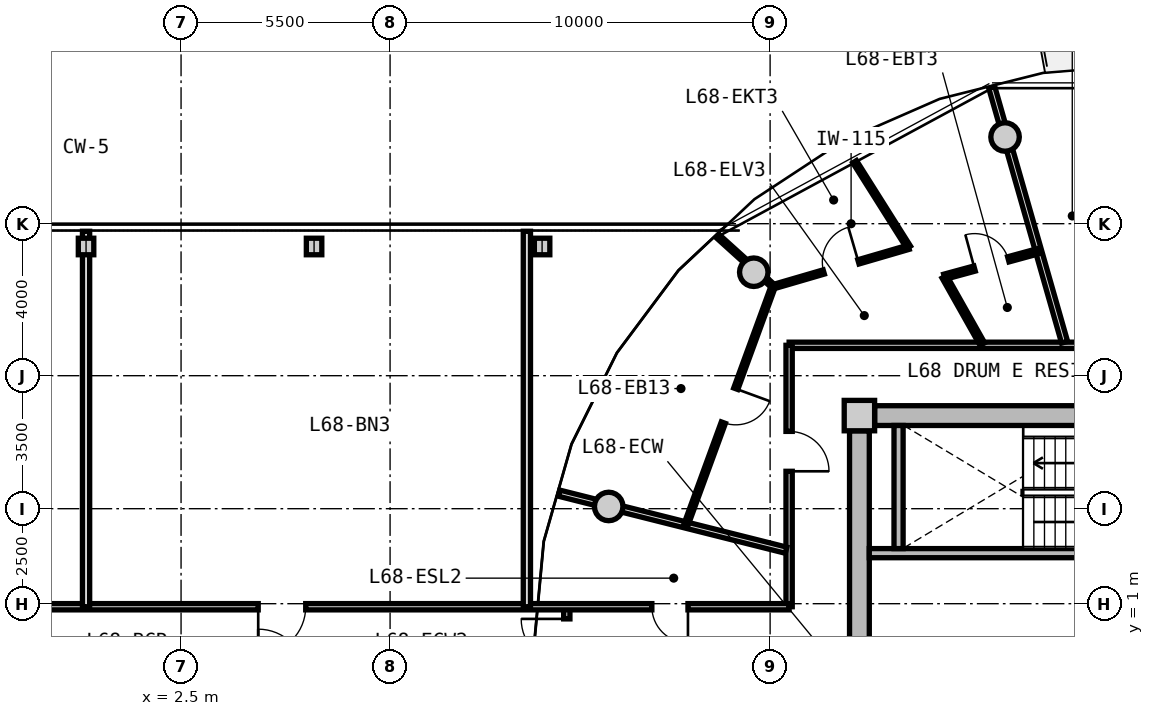
"""IFC4 building model, lengths in metres.
Left out: names, types, materials, properties, quantities, classifications, styles, units other than length and angle.
Written with IfcOpenShell. Run it as: python <this file> out.ifc"""

import sys

from ifc_helpers import new_model, si_unit, direction, frame, frame_2d, origin, origin_2d, place, context, subcontext, project, spatial, rectangle, circle, i_section, extrude, source, transform, mapped, element, fill, save


model = new_model("IFC4")
c1 = context("Model", 3, precision=1e-05, world=origin(), true_north=direction((0.0, 1.0)))
c2 = subcontext(c1, "Body", "Model", "MODEL_VIEW")
j1 = project(units=[si_unit("LENGTHUNIT", "METRE"), si_unit("PLANEANGLEUNIT", "RADIAN")], contexts=[c1])
p1 = place(None, origin())
s1 = spatial("IfcSite", under=j1, at=p1, CompositionType="ELEMENT")
p2 = place(p1, origin())
s2 = spatial("IfcBuilding", under=s1, at=p2, CompositionType="ELEMENT")
p3 = place(p2, frame((0.0, 0.0, 220.0)))
s3 = spatial("IfcBuildingStorey", under=s2, at=p3, CompositionType="ELEMENT", Elevation=220.0)
m1 = source(origin(), c2, "Body", "SweptSolid", [
    extrude(rectangle(XDim=0.8, YDim=0.8, at=origin_2d()), origin(), (0.0, 0.0, 1.0), 3.05),
])
p4 = place(p3, frame((20.35, 5.95, 0.0), z_axis=(0.0, 0.0, 1.0), x_axis=(1.0, 0.0, 0.0)))
e1 = element("IfcColumn", 1, at=p4, inside=s3, PredefinedType="COLUMN", context=c2, shape_type="MappedRepresentation", body=[
    mapped(m1, transform((0.0, 0.0, 0.0), x_axis=(1.0, 0.0, 0.0), y_axis=(0.0, 1.0, 0.0), z_axis=(0.0, 0.0, 1.0), scale=1.0)),
])
m2 = source(origin(), c2, "Body", "SweptSolid", [
    extrude(rectangle(XDim=14.5, YDim=0.52, at=frame_2d((7.25, 0.0))), origin(), (0.0, 0.0, 1.0), 2.76),
])
p5 = place(p3, frame((20.75, 5.95, 0.0), z_axis=(0.0, 0.0, 1.0), x_axis=(1.0, 0.0, 0.0)))
e2 = element("IfcWall", 2, at=p5, inside=s3, PredefinedType="SHEAR", context=c2, shape_type="MappedRepresentation", body=[
    mapped(m2, transform((0.0, 0.0, 0.0), x_axis=(1.0, 0.0, 0.0), y_axis=(0.0, 1.0, 0.0), z_axis=(0.0, 0.0, 1.0), scale=1.0)),
])
m3 = source(origin(), c2, "Body", "SweptSolid", [
    extrude(rectangle(XDim=11.1, YDim=0.52, at=frame_2d((5.55, 0.0))), origin(), (0.0, 0.0, 1.0), 2.76),
])
p6 = place(p3, frame((20.35, -5.55, 0.0), z_axis=(0.0, 0.0, 1.0), x_axis=(0.0, 1.0, 0.0)))
e3 = element("IfcWall", 3, at=p6, inside=s3, PredefinedType="SHEAR", context=c2, shape_type="MappedRepresentation", body=[
    mapped(m3, transform((0.0, 0.0, 0.0), x_axis=(1.0, 0.0, 0.0), y_axis=(0.0, 1.0, 0.0), z_axis=(0.0, 0.0, 1.0), scale=1.0)),
])
p7 = place(p6, frame((3.8, 0.0, 0.0)))
e4 = element("IfcOpeningElement", 4, at=p7, cuts=e3, PredefinedType="OPENING", context=c2, shape_type="SweptSolid", body=[
    extrude(rectangle(XDim=1.2, YDim=2.15, at=frame_2d((0.6, 1.075))), frame((0.0, 0.27, 0.0), z_axis=(0.0, -1.0, 0.0), x_axis=(1.0, 0.0, 0.0)), (0.0, 0.0, 1.0), 0.54),
])
m4 = source(origin(), c2, "Body", "SweptSolid", [
    extrude(circle(Radius=0.375, at=origin_2d()), origin(), (0.0, 0.0, 1.0), 3.05),
])
for number, where, z_axis, x_axis in (
    (5, (24.182, 13.281, 0.0), (0.0, 0.0, 1.0), (1.0, 0.0, 0.0)),
    (6, (17.57, 9.723, 0.0), (0.0, 0.0, 1.0), (1.0, 0.0, 0.0)),
    (7, (13.753, 3.559, 0.0), (0.0, 0.0, 1.0), (1.0, 0.0, 0.0)),
):
    element("IfcColumn", number, at=place(p3, frame(where, z_axis=z_axis, x_axis=x_axis)), inside=s3, PredefinedType="COLUMN", context=c2, shape_type="MappedRepresentation", body=[
        mapped(m4, transform((0.0, 0.0, 0.0), x_axis=(1.0, 0.0, 0.0), y_axis=(0.0, 1.0, 0.0), z_axis=(0.0, 0.0, 1.0), scale=1.0)),
    ])
m5 = source(origin(), c2, "Body", "SweptSolid", [
    extrude(i_section(OverallWidth=0.407, OverallDepth=0.435, WebThickness=0.024, FlangeThickness=0.039, FilletRadius=0.015, at=origin_2d()), origin(), (0.0, 0.0, 1.0), 3.05),
])
for number, where, z_axis, x_axis in (
    (8, (0.0, 10.4, 0.0), (0.0, 0.0, 1.0), (1.0, 0.0, 0.0)),
    (9, (6.0, 10.4, 0.0), (0.0, 0.0, 1.0), (1.0, 0.0, 0.0)),
    (10, (12.0, 10.4, 0.0), (0.0, 0.0, 1.0), (1.0, 0.0, 0.0)),
):
    element("IfcColumn", number, at=place(p3, frame(where, z_axis=z_axis, x_axis=x_axis)), inside=s3, PredefinedType="COLUMN", context=c2, shape_type="MappedRepresentation", body=[
        mapped(m5, transform((0.0, 0.0, 0.0), x_axis=(1.0, 0.0, 0.0), y_axis=(0.0, 1.0, 0.0), z_axis=(0.0, 0.0, 1.0), scale=1.0)),
    ])
m6 = source(origin(), c2, "Body", "SweptSolid", [
    extrude(rectangle(XDim=7.93, YDim=0.24, at=frame_2d((3.965, 0.0))), origin(), (0.0, 0.0, 1.0), 2.76),
])
p8 = place(p3, frame((20.61, 2.33, 0.0), z_axis=(0.0, 0.0, 1.0), x_axis=(1.0, 0.0, 0.0)))
e11 = element("IfcWall", 11, at=p8, inside=s3, PredefinedType="PARTITIONING", context=c2, shape_type="MappedRepresentation", body=[
    mapped(m6, transform((0.0, 0.0, 0.0), x_axis=(1.0, 0.0, 0.0), y_axis=(0.0, 1.0, 0.0), z_axis=(0.0, 0.0, 1.0), scale=1.0)),
])
m7 = source(origin(), c2, "Body", "SweptSolid", [
    extrude(rectangle(XDim=3.24, YDim=0.24, at=frame_2d((1.62, 0.0))), origin(), (0.0, 0.0, 1.0), 2.76),
])
p9 = place(p3, frame((21.38, 2.45, 0.0), z_axis=(0.0, 0.0, 1.0), x_axis=(0.0, 1.0, 0.0)))
e12 = element("IfcWall", 12, at=p9, inside=s3, PredefinedType="PARTITIONING", context=c2, shape_type="MappedRepresentation", body=[
    mapped(m7, transform((0.0, 0.0, 0.0), x_axis=(1.0, 0.0, 0.0), y_axis=(0.0, 1.0, 0.0), z_axis=(0.0, 0.0, 1.0), scale=1.0)),
])
m8 = source(origin(), c2, "Body", "SweptSolid", [
    extrude(rectangle(XDim=8.58, YDim=0.165, at=frame_2d((4.29, 0.0))), origin(), (0.0, 0.0, 1.0), 2.745),
])
p10 = place(p3, frame((18.5, 7.8, 0.0), z_axis=(0.0, 0.0, 1.0), x_axis=(1.0, 0.0, 0.0)))
e13 = element("IfcWall", 13, at=p10, inside=s3, PredefinedType="PARTITIONING", context=c2, shape_type="MappedRepresentation", body=[
    mapped(m8, transform((0.0, 0.0, 0.0), x_axis=(1.0, 0.0, 0.0), y_axis=(0.0, 1.0, 0.0), z_axis=(0.0, 0.0, 1.0), scale=1.0)),
])
m9 = source(origin(), c2, "Body", "SweptSolid", [
    extrude(rectangle(XDim=6.88, YDim=0.165, at=frame_2d((3.44, 0.0))), origin(), (0.0, 0.0, 1.0), 2.745),
])
p11 = place(p3, frame((18.5, 0.92, 0.0), z_axis=(0.0, 0.0, 1.0), x_axis=(0.0, 1.0, 0.0)))
e14 = element("IfcWall", 14, at=p11, inside=s3, PredefinedType="PARTITIONING", context=c2, shape_type="MappedRepresentation", body=[
    mapped(m9, transform((0.0, 0.0, 0.0), x_axis=(1.0, 0.0, 0.0), y_axis=(0.0, 1.0, 0.0), z_axis=(0.0, 0.0, 1.0), scale=1.0)),
])
p12 = place(p11, frame((3.564, 0.0, 0.0)))
e15 = element("IfcOpeningElement", 15, at=p12, cuts=e14, PredefinedType="OPENING", context=c2, shape_type="SweptSolid", body=[
    extrude(rectangle(XDim=1.05, YDim=2.15, at=frame_2d((0.525, 1.075))), frame((0.0, 0.093, 0.0), z_axis=(0.0, -1.0, 0.0), x_axis=(1.0, 0.0, 0.0)), (0.0, 0.0, 1.0), 0.185),
])
m10 = source(origin(), c2, "Body", "SweptSolid", [
    extrude(rectangle(XDim=6.974, YDim=0.165, at=frame_2d((3.487, 0.0))), origin(), (0.0, 0.0, 1.0), 2.345),
])
p13 = place(p3, frame((25.749, 7.88, 0.0), z_axis=(0.0, 0.0, 1.0), x_axis=(-0.274707256801, 0.961527910703, 0.0)))
e16 = element("IfcWall", 16, at=p13, inside=s3, PredefinedType="PARTITIONING", context=c2, shape_type="MappedRepresentation", body=[
    mapped(m10, transform((0.0, 0.0, 0.0), x_axis=(1.0, 0.0, 0.0), y_axis=(0.0, 1.0, 0.0), z_axis=(0.0, 0.0, 1.0), scale=1.0)),
])
m11 = source(origin(), c2, "Body", "SweptSolid", [
    extrude(rectangle(XDim=6.157, YDim=0.165, at=frame_2d((3.079, 0.0))), origin(), (0.0, 0.0, 1.0), 2.345),
])
p14 = place(p3, frame((18.42, 2.407, 0.0), z_axis=(0.0, 0.0, 1.0), x_axis=(-0.969840867184, 0.243738984038, 0.0)))
e17 = element("IfcWall", 17, at=p14, inside=s3, PredefinedType="PARTITIONING", context=c2, shape_type="MappedRepresentation", body=[
    mapped(m11, transform((0.0, 0.0, 0.0), x_axis=(1.0, 0.0, 0.0), y_axis=(0.0, 1.0, 0.0), z_axis=(0.0, 0.0, 1.0), scale=1.0)),
])
m12 = source(origin(), c2, "Body", "SweptSolid", [
    extrude(rectangle(XDim=6.69, YDim=0.115, at=frame_2d((3.345, 0.0))), origin(), (0.0, 0.0, 1.0), 2.745),
])
p15 = place(p3, frame((18.083, 9.352, 0.0), z_axis=(0.0, 0.0, 1.0), x_axis=(-0.343693784919, -0.939081776102, 0.0)))
e18 = element("IfcWall", 18, at=p15, inside=s3, PredefinedType="PARTITIONING", context=c2, shape_type="MappedRepresentation", body=[
    mapped(m12, transform((0.0, 0.0, 0.0), x_axis=(1.0, 0.0, 0.0), y_axis=(0.0, 1.0, 0.0), z_axis=(0.0, 0.0, 1.0), scale=1.0)),
])
p16 = place(p15, frame((2.87, 0.0, 0.0)))
e19 = element("IfcOpeningElement", 19, at=p16, cuts=e18, PredefinedType="OPENING", context=c2, shape_type="SweptSolid", body=[
    extrude(rectangle(XDim=0.95, YDim=2.1, at=frame_2d((0.475, 1.05))), frame((0.0, 0.067, 0.0), z_axis=(0.0, -1.0, 0.0), x_axis=(1.0, 0.0, 0.0)), (0.0, 0.0, 1.0), 0.135),
])
m13 = source(origin(), c2, "Body", "SweptSolid", [
    extrude(rectangle(XDim=1.977, YDim=0.115, at=frame_2d((0.989, 0.0))), origin(), (0.0, 0.0, 1.0), 2.345),
])
p17 = place(p3, frame((18.083, 9.352, 0.0), z_axis=(0.0, 0.0, 1.0), x_axis=(-0.742064998629, 0.670327933037, 0.0)))
e20 = element("IfcWall", 20, at=p17, inside=s3, PredefinedType="PARTITIONING", context=c2, shape_type="MappedRepresentation", body=[
    mapped(m13, transform((0.0, 0.0, 0.0), x_axis=(1.0, 0.0, 0.0), y_axis=(0.0, 1.0, 0.0), z_axis=(0.0, 0.0, 1.0), scale=1.0)),
])
m14 = source(origin(), c2, "Body", "SweptSolid", [
    extrude(rectangle(XDim=2.035, YDim=0.14, at=frame_2d((1.018, 0.0))), origin(), (0.0, 0.0, 1.0), 2.745),
])
p18 = place(p3, frame((23.585, 7.83, 0.0), z_axis=(0.0, 0.0, 1.0), x_axis=(-0.491092509169, 0.871107425888, 0.0)))
e21 = element("IfcWall", 21, at=p18, inside=s3, PredefinedType="PARTITIONING", context=c2, shape_type="MappedRepresentation", body=[
    mapped(m14, transform((0.0, 0.0, 0.0), x_axis=(1.0, 0.0, 0.0), y_axis=(0.0, 1.0, 0.0), z_axis=(0.0, 0.0, 1.0), scale=1.0)),
])
m15 = source(origin(), c2, "Body", "SweptSolid", [
    extrude(rectangle(XDim=2.568, YDim=0.14, at=frame_2d((1.284, 0.0))), origin(), (0.0, 0.0, 1.0), 2.745),
])
p19 = place(p3, frame((22.585, 9.603, 0.0), z_axis=(0.0, 0.0, 1.0), x_axis=(0.964796726679, 0.262996722775, 0.0)))
e22 = element("IfcWall", 22, at=p19, inside=s3, PredefinedType="PARTITIONING", context=c2, shape_type="MappedRepresentation", body=[
    mapped(m15, transform((0.0, 0.0, 0.0), x_axis=(1.0, 0.0, 0.0), y_axis=(0.0, 1.0, 0.0), z_axis=(0.0, 0.0, 1.0), scale=1.0)),
])
p20 = place(p19, frame((0.824, 0.0, 0.0)))
e23 = element("IfcOpeningElement", 23, at=p20, cuts=e22, PredefinedType="OPENING", context=c2, shape_type="SweptSolid", body=[
    extrude(rectangle(XDim=0.92, YDim=2.1, at=frame_2d((0.46, 1.05))), frame((0.0, 0.08, 0.0), z_axis=(0.0, -1.0, 0.0), x_axis=(1.0, 0.0, 0.0)), (0.0, 0.0, 1.0), 0.16),
])
m16 = source(origin(), c2, "Body", "SweptSolid", [
    extrude(rectangle(XDim=2.662, YDim=0.115, at=frame_2d((1.331, 0.0))), origin(), (0.0, 0.0, 1.0), 2.745),
])
p21 = place(p3, frame((21.645, 10.38, 0.0), z_axis=(0.0, 0.0, 1.0), x_axis=(-0.533547747092, 0.845769946009, 0.0)))
e24 = element("IfcWall", 24, at=p21, inside=s3, PredefinedType="PARTITIONING", context=c2, shape_type="MappedRepresentation", body=[
    mapped(m16, transform((0.0, 0.0, 0.0), x_axis=(1.0, 0.0, 0.0), y_axis=(0.0, 1.0, 0.0), z_axis=(0.0, 0.0, 1.0), scale=1.0)),
])
m17 = source(origin(), c2, "Body", "SweptSolid", [
    extrude(rectangle(XDim=3.702, YDim=0.115, at=frame_2d((1.851, 0.0))), origin(), (0.0, 0.0, 1.0), 2.745),
])
p22 = place(p3, frame((21.645, 10.38, 0.0), z_axis=(0.0, 0.0, 1.0), x_axis=(-0.960044309887, -0.279848035645, 0.0)))
e25 = element("IfcWall", 25, at=p22, inside=s3, PredefinedType="PARTITIONING", context=c2, shape_type="MappedRepresentation", body=[
    mapped(m17, transform((0.0, 0.0, 0.0), x_axis=(1.0, 0.0, 0.0), y_axis=(0.0, 1.0, 0.0), z_axis=(0.0, 0.0, 1.0), scale=1.0)),
])
p23 = place(p22, frame((1.376, 0.0, 0.0)))
e26 = element("IfcOpeningElement", 26, at=p23, cuts=e25, PredefinedType="OPENING", context=c2, shape_type="SweptSolid", body=[
    extrude(rectangle(XDim=0.95, YDim=2.1, at=frame_2d((0.475, 1.05))), frame((0.0, 0.067, 0.0), z_axis=(0.0, -1.0, 0.0), x_axis=(1.0, 0.0, 0.0)), (0.0, 0.0, 1.0), 0.135),
])
m18 = source(origin(), c2, "Body", "SweptSolid", [
    extrude(rectangle(XDim=1.84, YDim=0.165, at=frame_2d((0.92, 0.0))), origin(), (0.0, 0.0, 1.0), 2.745),
])
p24 = place(p3, frame((12.65, -0.92, 0.0), z_axis=(0.0, 0.0, 1.0), x_axis=(0.0, 1.0, 0.0)))
e27 = element("IfcWall", 27, at=p24, inside=s3, PredefinedType="PARTITIONING", context=c2, shape_type="MappedRepresentation", body=[
    mapped(m18, transform((0.0, 0.0, 0.0), x_axis=(1.0, 0.0, 0.0), y_axis=(0.0, 1.0, 0.0), z_axis=(0.0, 0.0, 1.0), scale=1.0)),
])
p25 = place(p24, frame((0.32, 0.0, 0.0)))
e28 = element("IfcOpeningElement", 28, at=p25, cuts=e27, PredefinedType="OPENING", context=c2, shape_type="SweptSolid", body=[
    extrude(rectangle(XDim=1.2, YDim=2.15, at=frame_2d((0.6, 1.075))), frame((0.0, 0.093, 0.0), z_axis=(0.0, -1.0, 0.0), x_axis=(1.0, 0.0, 0.0)), (0.0, 0.0, 1.0), 0.185),
])
m19 = source(origin(), c2, "Body", "SweptSolid", [
    extrude(rectangle(XDim=37.0, YDim=0.165, at=frame_2d((18.5, 0.0))), origin(), (0.0, 0.0, 1.0), 2.745),
])
p26 = place(p3, frame((-18.5, 0.92, 0.0), z_axis=(0.0, 0.0, 1.0), x_axis=(1.0, 0.0, 0.0)))
e29 = element("IfcWall", 29, at=p26, inside=s3, PredefinedType="PARTITIONING", context=c2, shape_type="MappedRepresentation", body=[
    mapped(m19, transform((0.0, 0.0, 0.0), x_axis=(1.0, 0.0, 0.0), y_axis=(0.0, 1.0, 0.0), z_axis=(0.0, 0.0, 1.0), scale=1.0)),
])
p27 = place(p26, frame((2.662, 0.0, 0.0)))
e30 = element("IfcOpeningElement", 30, at=p27, cuts=e29, PredefinedType="OPENING", context=c2, shape_type="SweptSolid", body=[
    extrude(rectangle(XDim=0.95, YDim=2.1, at=frame_2d((0.475, 1.05))), frame((0.0, 0.093, 0.0), z_axis=(0.0, -1.0, 0.0), x_axis=(1.0, 0.0, 0.0)), (0.0, 0.0, 1.0), 0.185),
])
p28 = place(p26, frame((33.388, 0.0, 0.0)))
e31 = element("IfcOpeningElement", 31, at=p28, cuts=e29, PredefinedType="OPENING", context=c2, shape_type="SweptSolid", body=[
    extrude(rectangle(XDim=0.95, YDim=2.1, at=frame_2d((0.475, 1.05))), frame((0.0, 0.093, 0.0), z_axis=(0.0, -1.0, 0.0), x_axis=(1.0, 0.0, 0.0)), (0.0, 0.0, 1.0), 0.185),
])
p29 = place(p26, frame((7.64, 0.0, 0.0)))
e32 = element("IfcOpeningElement", 32, at=p29, cuts=e29, PredefinedType="OPENING", context=c2, shape_type="SweptSolid", body=[
    extrude(rectangle(XDim=0.92, YDim=2.1, at=frame_2d((0.46, 1.05))), frame((0.0, 0.093, 0.0), z_axis=(0.0, -1.0, 0.0), x_axis=(1.0, 0.0, 0.0)), (0.0, 0.0, 1.0), 0.185),
])
p30 = place(p26, frame((10.275, 0.0, 0.0)))
e33 = element("IfcOpeningElement", 33, at=p30, cuts=e29, PredefinedType="OPENING", context=c2, shape_type="SweptSolid", body=[
    extrude(rectangle(XDim=1.25, YDim=2.2, at=frame_2d((0.625, 1.1))), frame((0.0, 0.093, 0.0), z_axis=(0.0, -1.0, 0.0), x_axis=(1.0, 0.0, 0.0)), (0.0, 0.0, 1.0), 0.185),
])
p31 = place(p26, frame((14.875, 0.0, 0.0)))
e34 = element("IfcOpeningElement", 34, at=p31, cuts=e29, PredefinedType="OPENING", context=c2, shape_type="SweptSolid", body=[
    extrude(rectangle(XDim=1.25, YDim=2.2, at=frame_2d((0.625, 1.1))), frame((0.0, 0.093, 0.0), z_axis=(0.0, -1.0, 0.0), x_axis=(1.0, 0.0, 0.0)), (0.0, 0.0, 1.0), 0.185),
])
p32 = place(p26, frame((23.03, 0.0, 0.0)))
e35 = element("IfcOpeningElement", 35, at=p32, cuts=e29, PredefinedType="OPENING", context=c2, shape_type="SweptSolid", body=[
    extrude(rectangle(XDim=1.25, YDim=2.2, at=frame_2d((0.625, 1.1))), frame((0.0, 0.093, 0.0), z_axis=(0.0, -1.0, 0.0), x_axis=(1.0, 0.0, 0.0)), (0.0, 0.0, 1.0), 0.185),
])
m20 = source(origin(), c2, "Body", "SweptSolid", [
    extrude(rectangle(XDim=9.88, YDim=0.19, at=frame_2d((4.94, 0.0))), origin(), (0.0, 0.0, 1.0), 2.745),
])
p33 = place(p3, frame((11.6, 0.92, 0.0), z_axis=(0.0, 0.0, 1.0), x_axis=(0.0, 1.0, 0.0)))
e36 = element("IfcWall", 36, at=p33, inside=s3, PredefinedType="PARTITIONING", context=c2, shape_type="MappedRepresentation", body=[
    mapped(m20, transform((0.0, 0.0, 0.0), x_axis=(1.0, 0.0, 0.0), y_axis=(0.0, 1.0, 0.0), z_axis=(0.0, 0.0, 1.0), scale=1.0)),
])
m21 = source(origin(), c2, "Body", "SweptSolid", [
    extrude(rectangle(XDim=9.88, YDim=0.19, at=frame_2d((4.94, 0.0))), origin(), (0.0, 0.0, 1.0), 2.045),
])
p34 = place(p3, frame((0.0, 0.92, 0.0), z_axis=(0.0, 0.0, 1.0), x_axis=(0.0, 1.0, 0.0)))
e37 = element("IfcWall", 37, at=p34, inside=s3, PredefinedType="PARTITIONING", context=c2, shape_type="MappedRepresentation", body=[
    mapped(m21, transform((0.0, 0.0, 0.0), x_axis=(1.0, 0.0, 0.0), y_axis=(0.0, 1.0, 0.0), z_axis=(0.0, 0.0, 1.0), scale=1.0)),
])
m22 = source(origin(), c2, "Body", "SweptSolid", [
    extrude(rectangle(XDim=0.95, YDim=2.1, at=frame_2d((0.475, 1.05))), frame((0.0, 0.025, 0.0), z_axis=(0.0, -1.0, 0.0), x_axis=(1.0, 0.0, 0.0)), (0.0, 0.0, 1.0), 0.05),
])
p35 = place(p28, frame((0.95, 0.0, 0.0), z_axis=(0.0, 0.0, 1.0), x_axis=(-1.0, 0.0, 0.0)))
e38 = element("IfcDoor", 38, at=p35, inside=s3, OperationType="SINGLE_SWING_LEFT", PredefinedType="DOOR", context=c2, shape_type="MappedRepresentation", body=[
    mapped(m22, transform((0.0, 0.0, 0.0), x_axis=(1.0, 0.0, 0.0), y_axis=(0.0, 1.0, 0.0), z_axis=(0.0, 0.0, 1.0), scale=1.0)),
])
fill(e31, e38)
m23 = source(origin(), c2, "Body", "SweptSolid", [
    extrude(rectangle(XDim=1.05, YDim=2.15, at=frame_2d((0.525, 1.075))), frame((0.0, 0.025, 0.0), z_axis=(0.0, -1.0, 0.0), x_axis=(1.0, 0.0, 0.0)), (0.0, 0.0, 1.0), 0.05),
])
p36 = place(p12, frame((1.05, 0.0, 0.0), z_axis=(0.0, 0.0, 1.0), x_axis=(-1.0, 0.0, 0.0)))
e39 = element("IfcDoor", 39, at=p36, inside=s3, OperationType="SINGLE_SWING_RIGHT", PredefinedType="DOOR", context=c2, shape_type="MappedRepresentation", body=[
    mapped(m23, transform((0.0, 0.0, 0.0), x_axis=(1.0, 0.0, 0.0), y_axis=(0.0, 1.0, 0.0), z_axis=(0.0, 0.0, 1.0), scale=1.0)),
])
fill(e15, e39)
m24 = source(origin(), c2, "Body", "SweptSolid", [
    extrude(rectangle(XDim=0.92, YDim=2.1, at=frame_2d((0.46, 1.05))), frame((0.0, 0.025, 0.0), z_axis=(0.0, -1.0, 0.0), x_axis=(1.0, 0.0, 0.0)), (0.0, 0.0, 1.0), 0.05),
])
p37 = place(p20, origin())
e40 = element("IfcDoor", 40, at=p37, inside=s3, OperationType="SINGLE_SWING_LEFT", PredefinedType="DOOR", context=c2, shape_type="MappedRepresentation", body=[
    mapped(m24, transform((0.0, 0.0, 0.0), x_axis=(1.0, 0.0, 0.0), y_axis=(0.0, 1.0, 0.0), z_axis=(0.0, 0.0, 1.0), scale=1.0)),
])
fill(e23, e40)
p38 = place(p23, frame((0.95, 0.0, 0.0), z_axis=(0.0, 0.0, 1.0), x_axis=(-1.0, 0.0, 0.0)))
e41 = element("IfcDoor", 41, at=p38, inside=s3, OperationType="SINGLE_SWING_RIGHT", PredefinedType="DOOR", context=c2, shape_type="MappedRepresentation", body=[
    mapped(m22, transform((0.0, 0.0, 0.0), x_axis=(1.0, 0.0, 0.0), y_axis=(0.0, 1.0, 0.0), z_axis=(0.0, 0.0, 1.0), scale=1.0)),
])
fill(e26, e41)
p39 = place(p16, origin())
e42 = element("IfcDoor", 42, at=p39, inside=s3, OperationType="SINGLE_SWING_LEFT", PredefinedType="DOOR", context=c2, shape_type="MappedRepresentation", body=[
    mapped(m22, transform((0.0, 0.0, 0.0), x_axis=(1.0, 0.0, 0.0), y_axis=(0.0, 1.0, 0.0), z_axis=(0.0, 0.0, 1.0), scale=1.0)),
])
fill(e19, e42)
m25 = source(origin(), c2, "Body", "SweptSolid", [
    extrude(rectangle(XDim=1.2, YDim=2.15, at=frame_2d((0.6, 1.075))), frame((0.0, 0.025, 0.0), z_axis=(0.0, -1.0, 0.0), x_axis=(1.0, 0.0, 0.0)), (0.0, 0.0, 1.0), 0.05),
])
p40 = place(p25, origin())
e43 = element("IfcDoor", 43, at=p40, inside=s3, OperationType="SINGLE_SWING_RIGHT", PredefinedType="DOOR", context=c2, shape_type="MappedRepresentation", body=[
    mapped(m25, transform((0.0, 0.0, 0.0), x_axis=(1.0, 0.0, 0.0), y_axis=(0.0, 1.0, 0.0), z_axis=(0.0, 0.0, 1.0), scale=1.0)),
])
fill(e28, e43)
m26 = source(origin(), c2, "Body", "SweptSolid", [
    extrude(rectangle(XDim=1.25, YDim=2.2, at=frame_2d((0.625, 1.1))), frame((0.0, 0.025, 0.0), z_axis=(0.0, -1.0, 0.0), x_axis=(1.0, 0.0, 0.0)), (0.0, 0.0, 1.0), 0.05),
])
p41 = place(p32, frame((1.25, 0.0, 0.0), z_axis=(0.0, 0.0, 1.0), x_axis=(-1.0, 0.0, 0.0)))
e44 = element("IfcDoor", 44, at=p41, inside=s3, OperationType="SINGLE_SWING_RIGHT", PredefinedType="DOOR", context=c2, shape_type="MappedRepresentation", body=[
    mapped(m26, transform((0.0, 0.0, 0.0), x_axis=(1.0, 0.0, 0.0), y_axis=(0.0, 1.0, 0.0), z_axis=(0.0, 0.0, 1.0), scale=1.0)),
])
fill(e35, e44)
save(model, sys.argv[1])
